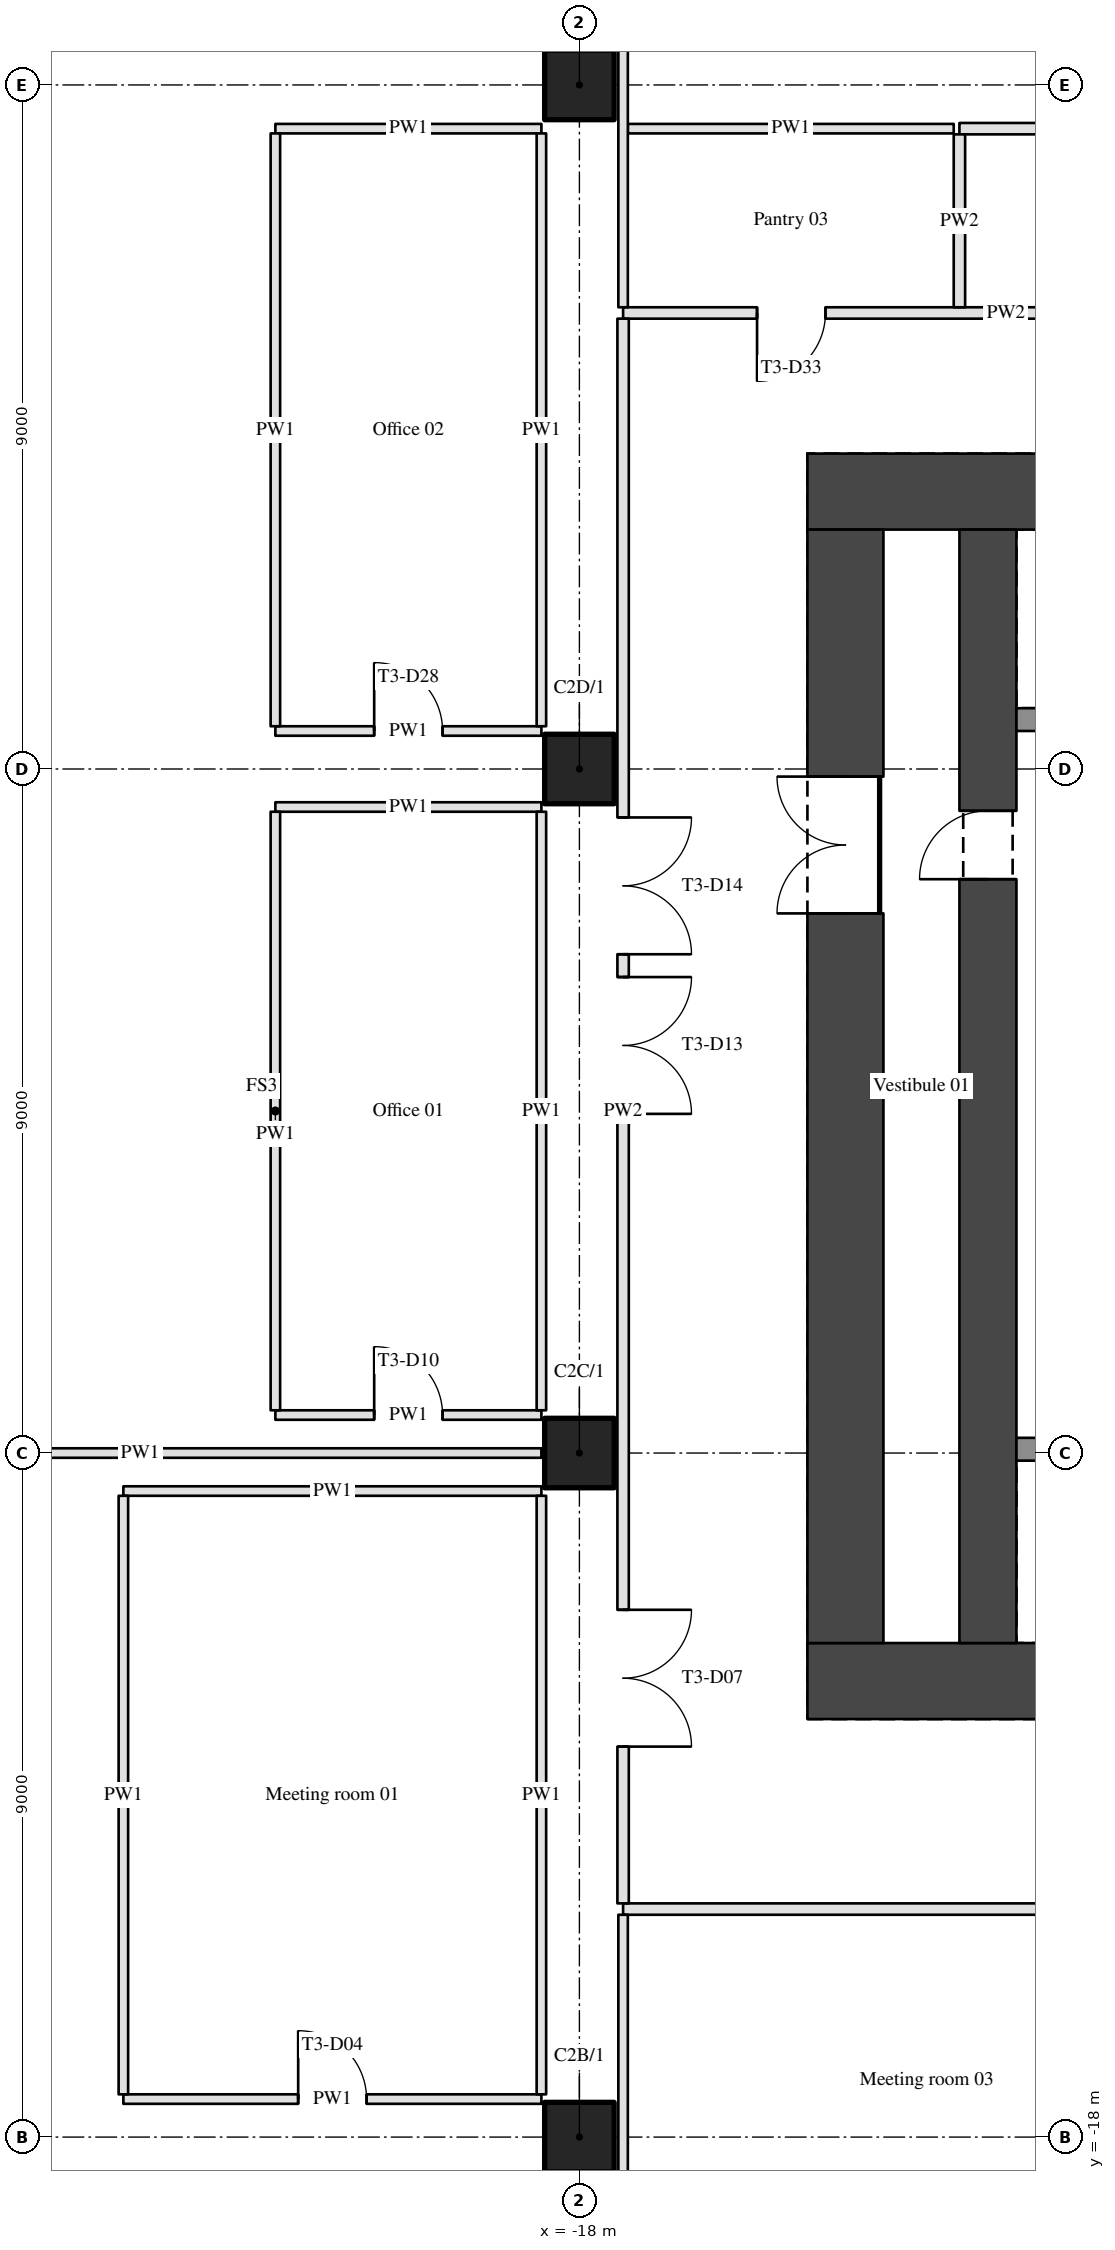
"""IFC4 building model, lengths in metres.
Left out: names, types, materials, properties, quantities, classifications, styles, units other than length and angle.
Written with IfcOpenShell. Run it as: python <this file> out.ifc"""

import sys

from ifc_helpers import new_model, si_unit, direction, frame, frame_2d, origin, origin_2d, place, context, subcontext, project, spatial, rectangle, hollow_circle, extrude, element, fill, save


model = new_model("IFC4")
c1 = context("Model", 3, precision=1e-05, world=origin(), true_north=direction((0.0, 1.0)))
c2 = subcontext(c1, "Body", "Model", "MODEL_VIEW")
j1 = project(units=[si_unit("LENGTHUNIT", "METRE"), si_unit("PLANEANGLEUNIT", "RADIAN")], contexts=[c1])
p1 = place(None, origin())
s1 = spatial("IfcSite", under=j1, at=p1, CompositionType="ELEMENT")
p2 = place(p1, origin())
s2 = spatial("IfcBuilding", under=s1, at=p2, CompositionType="ELEMENT")
p3 = place(p2, frame((0.0, 0.0, 53.7)))
s3 = spatial("IfcBuildingStorey", under=s2, at=p3, CompositionType="ELEMENT", Elevation=53.7)
for number, where, z_axis, x_axis in (
    (1, (-18.0, -18.0, 0.0), (0.0, 0.0, 1.0), (1.0, 0.0, 0.0)),
    (2, (-18.0, -9.0, 0.0), (0.0, 0.0, 1.0), (1.0, 0.0, 0.0)),
    (3, (-18.0, 0.0, 0.0), (0.0, 0.0, 1.0), (1.0, 0.0, 0.0)),
    (4, (-18.0, 9.0, 0.0), (0.0, 0.0, 1.0), (1.0, 0.0, 0.0)),
):
    element("IfcColumn", number, at=place(p3, frame(where, z_axis=z_axis, x_axis=x_axis)), inside=s3, PredefinedType="COLUMN", context=c2, shape_type="SweptSolid", body=[
        extrude(hollow_circle(Radius=0.457, WallThickness=0.05, at=origin_2d()), origin(), (0.0, 0.0, 1.0), 3.9),
    ])
for number, where, z_axis, x_axis in (
    (5, (-15.0, -12.0, 0.0), (0.0, 0.0, 1.0), (1.0, 0.0, 0.0)),
    (6, (-15.0, 3.65, 0.0), (0.0, 0.0, 1.0), (1.0, 0.0, 0.0)),
):
    element("IfcWall", number, at=place(p3, frame(where, z_axis=z_axis, x_axis=x_axis)), inside=s3, PredefinedType="SHEAR", context=c2, shape_type="SweptSolid", body=[
        extrude(rectangle(XDim=30.0, YDim=1.0, at=frame_2d((15.0, 0.0))), origin(), (0.0, 0.0, 1.0), 3.9),
    ])
p4 = place(p3, frame((-14.5, -11.5, 0.0), z_axis=(0.0, 0.0, 1.0), x_axis=(0.0, 1.0, 0.0)))
e7 = element("IfcWall", 7, at=p4, inside=s3, PredefinedType="SHEAR", context=c2, shape_type="SweptSolid", body=[
    extrude(rectangle(XDim=14.65, YDim=1.0, at=frame_2d((7.325, 0.0))), origin(), (0.0, 0.0, 1.0), 3.9),
])
p5 = place(p4, frame((9.6, 0.0, 0.0)))
e8 = element("IfcOpeningElement", 8, at=p5, cuts=e7, PredefinedType="OPENING", context=c2, shape_type="SweptSolid", body=[
    extrude(rectangle(XDim=1.8, YDim=2.1, at=frame_2d((0.9, 1.05))), frame((0.0, 0.51, 0.0), z_axis=(0.0, -1.0, 0.0), x_axis=(1.0, 0.0, 0.0)), (0.0, 0.0, 1.0), 1.02),
])
p6 = place(p3, frame((-12.625, -11.5, 0.0), z_axis=(0.0, 0.0, 1.0), x_axis=(0.0, 1.0, 0.0)))
e9 = element("IfcWall", 9, at=p6, inside=s3, PredefinedType="SHEAR", context=c2, shape_type="SweptSolid", body=[
    extrude(rectangle(XDim=14.65, YDim=0.75, at=frame_2d((7.325, 0.0))), origin(), (0.0, 0.0, 1.0), 3.9),
])
p7 = place(p6, frame((10.05, 0.0, 0.0)))
e10 = element("IfcOpeningElement", 10, at=p7, cuts=e9, PredefinedType="OPENING", context=c2, shape_type="SweptSolid", body=[
    extrude(rectangle(XDim=0.9, YDim=2.1, at=frame_2d((0.45, 1.05))), frame((0.0, 0.385, 0.0), z_axis=(0.0, -1.0, 0.0), x_axis=(1.0, 0.0, 0.0)), (0.0, 0.0, 1.0), 0.77),
])
p8 = place(p3, frame((-24.0, -17.5, 0.0), z_axis=(0.0, 0.0, 1.0), x_axis=(1.0, 0.0, 0.0)))
e11 = element("IfcWall", 11, at=p8, inside=s3, PredefinedType="PARTITIONING", context=c2, shape_type="SweptSolid", body=[
    extrude(rectangle(XDim=5.5, YDim=0.125, at=frame_2d((2.75, 0.0))), origin(), (0.0, 0.0, 1.0), 2.96),
])
p9 = place(p8, frame((2.3, 0.0, 0.0)))
e12 = element("IfcOpeningElement", 12, at=p9, cuts=e11, PredefinedType="OPENING", context=c2, shape_type="SweptSolid", body=[
    extrude(rectangle(XDim=0.9, YDim=2.1, at=frame_2d((0.45, 1.05))), frame((0.0, 0.073, 0.0), z_axis=(0.0, -1.0, 0.0), x_axis=(1.0, 0.0, 0.0)), (0.0, 0.0, 1.0), 0.145),
])
p10 = place(p3, frame((-17.425, -15.0, 0.0), z_axis=(0.0, 0.0, 1.0), x_axis=(1.0, 0.0, 0.0)))
e13 = element("IfcWall", 13, at=p10, inside=s3, PredefinedType="PARTITIONING", context=c2, shape_type="SweptSolid", body=[
    extrude(rectangle(XDim=34.85, YDim=0.15, at=frame_2d((17.425, 0.0))), origin(), (0.0, 0.0, 1.0), 2.96),
])
p11 = place(p10, frame((25.238, 0.0, 0.0)))
e14 = element("IfcOpeningElement", 14, at=p11, cuts=e13, PredefinedType="OPENING", context=c2, shape_type="SweptSolid", body=[
    extrude(rectangle(XDim=1.8, YDim=2.1, at=frame_2d((0.9, 1.05))), frame((0.0, 0.085, 0.0), z_axis=(0.0, -1.0, 0.0), x_axis=(1.0, 0.0, 0.0)), (0.0, 0.0, 1.0), 0.17),
])
p12 = place(p10, frame((23.137, 0.0, 0.0)))
e15 = element("IfcOpeningElement", 15, at=p12, cuts=e13, PredefinedType="OPENING", context=c2, shape_type="SweptSolid", body=[
    extrude(rectangle(XDim=1.8, YDim=2.1, at=frame_2d((0.9, 1.05))), frame((0.0, 0.085, 0.0), z_axis=(0.0, -1.0, 0.0), x_axis=(1.0, 0.0, 0.0)), (0.0, 0.0, 1.0), 0.17),
])
p13 = place(p3, frame((-24.0, -9.5, 0.0), z_axis=(0.0, 0.0, 1.0), x_axis=(1.0, 0.0, 0.0)))
e16 = element("IfcWall", 16, at=p13, inside=s3, PredefinedType="PARTITIONING", context=c2, shape_type="SweptSolid", body=[
    extrude(rectangle(XDim=5.5, YDim=0.125, at=frame_2d((2.75, 0.0))), origin(), (0.0, 0.0, 1.0), 2.96),
])
p14 = place(p3, frame((-29.057, -9.0, 0.0), z_axis=(0.0, 0.0, 1.0), x_axis=(1.0, 0.0, 0.0)))
e17 = element("IfcWall", 17, at=p14, inside=s3, PredefinedType="PARTITIONING", context=c2, shape_type="SweptSolid", body=[
    extrude(rectangle(XDim=10.557, YDim=0.125, at=frame_2d((5.278, 0.0))), origin(), (0.0, 0.0, 1.0), 2.96),
])
p15 = place(p3, frame((-12.25, -8.95, 0.0), z_axis=(0.0, 0.0, 1.0), x_axis=(1.0, 0.0, 0.0)))
e18 = element("IfcWall", 18, at=p15, inside=s3, PredefinedType="SHEAR", context=c2, shape_type="SweptSolid", body=[
    extrude(rectangle(XDim=2.75, YDim=0.3, at=frame_2d((1.375, 0.0))), origin(), (0.0, 0.0, 1.0), 3.9),
])
p16 = place(p3, frame((-22.0, -8.5, 0.0), z_axis=(0.0, 0.0, 1.0), x_axis=(1.0, 0.0, 0.0)))
e19 = element("IfcWall", 19, at=p16, inside=s3, PredefinedType="PARTITIONING", context=c2, shape_type="SweptSolid", body=[
    extrude(rectangle(XDim=3.5, YDim=0.125, at=frame_2d((1.75, 0.0))), origin(), (0.0, 0.0, 1.0), 2.96),
])
p17 = place(p16, frame((1.3, 0.0, 0.0)))
e20 = element("IfcOpeningElement", 20, at=p17, cuts=e19, PredefinedType="OPENING", context=c2, shape_type="SweptSolid", body=[
    extrude(rectangle(XDim=0.9, YDim=2.1, at=frame_2d((0.45, 1.05))), frame((0.0, 0.073, 0.0), z_axis=(0.0, -1.0, 0.0), x_axis=(1.0, 0.0, 0.0)), (0.0, 0.0, 1.0), 0.145),
])
p18 = place(p3, frame((-22.0, -0.5, 0.0), z_axis=(0.0, 0.0, 1.0), x_axis=(1.0, 0.0, 0.0)))
e21 = element("IfcWall", 21, at=p18, inside=s3, PredefinedType="PARTITIONING", context=c2, shape_type="SweptSolid", body=[
    extrude(rectangle(XDim=3.5, YDim=0.125, at=frame_2d((1.75, 0.0))), origin(), (0.0, 0.0, 1.0), 2.96),
])
p19 = place(p3, frame((-22.0, 0.5, 0.0), z_axis=(0.0, 0.0, 1.0), x_axis=(1.0, 0.0, 0.0)))
e22 = element("IfcWall", 22, at=p19, inside=s3, PredefinedType="PARTITIONING", context=c2, shape_type="SweptSolid", body=[
    extrude(rectangle(XDim=3.5, YDim=0.125, at=frame_2d((1.75, 0.0))), origin(), (0.0, 0.0, 1.0), 2.96),
])
p20 = place(p19, frame((1.3, 0.0, 0.0)))
e23 = element("IfcOpeningElement", 23, at=p20, cuts=e22, PredefinedType="OPENING", context=c2, shape_type="SweptSolid", body=[
    extrude(rectangle(XDim=0.9, YDim=2.1, at=frame_2d((0.45, 1.05))), frame((0.0, 0.073, 0.0), z_axis=(0.0, -1.0, 0.0), x_axis=(1.0, 0.0, 0.0)), (0.0, 0.0, 1.0), 0.145),
])
p21 = place(p3, frame((-9.0, 0.65, 0.0), z_axis=(0.0, 0.0, 1.0), x_axis=(-1.0, 0.0, 0.0)))
e24 = element("IfcWall", 24, at=p21, inside=s3, PredefinedType="SHEAR", context=c2, shape_type="SweptSolid", body=[
    extrude(rectangle(XDim=3.25, YDim=0.3, at=frame_2d((1.625, 0.0))), origin(), (0.0, 0.0, 1.0), 3.9),
])
p22 = place(p3, frame((-7.35, 6.0, 0.0), z_axis=(0.0, 0.0, 1.0), x_axis=(-1.0, 0.0, 0.0)))
e25 = element("IfcWall", 25, at=p22, inside=s3, PredefinedType="PARTITIONING", context=c2, shape_type="SweptSolid", body=[
    extrude(rectangle(XDim=10.075, YDim=0.15, at=frame_2d((5.038, 0.0))), origin(), (0.0, 0.0, 1.0), 2.96),
])
p23 = place(p22, frame((2.325, 0.0, 0.0)))
e26 = element("IfcOpeningElement", 26, at=p23, cuts=e25, PredefinedType="OPENING", context=c2, shape_type="SweptSolid", body=[
    extrude(rectangle(XDim=1.0, YDim=2.1, at=frame_2d((0.5, 1.05))), frame((0.0, 0.085, 0.0), z_axis=(0.0, -1.0, 0.0), x_axis=(1.0, 0.0, 0.0)), (0.0, 0.0, 1.0), 0.17),
])
p24 = place(p22, frame((7.413, 0.0, 0.0)))
e27 = element("IfcOpeningElement", 27, at=p24, cuts=e25, PredefinedType="OPENING", context=c2, shape_type="SweptSolid", body=[
    extrude(rectangle(XDim=0.9, YDim=2.1, at=frame_2d((0.45, 1.05))), frame((0.0, 0.085, 0.0), z_axis=(0.0, -1.0, 0.0), x_axis=(1.0, 0.0, 0.0)), (0.0, 0.0, 1.0), 0.17),
])
p25 = place(p3, frame((-22.0, 8.425, 0.0), z_axis=(0.0, 0.0, 1.0), x_axis=(1.0, 0.0, 0.0)))
e28 = element("IfcWall", 28, at=p25, inside=s3, PredefinedType="PARTITIONING", context=c2, shape_type="SweptSolid", body=[
    extrude(rectangle(XDim=3.5, YDim=0.125, at=frame_2d((1.75, 0.0))), origin(), (0.0, 0.0, 1.0), 2.96),
])
p26 = place(p3, frame((-17.363, 8.425, 0.0), z_axis=(0.0, 0.0, 1.0), x_axis=(1.0, 0.0, 0.0)))
e29 = element("IfcWall", 29, at=p26, inside=s3, PredefinedType="PARTITIONING", context=c2, shape_type="SweptSolid", body=[
    extrude(rectangle(XDim=4.288, YDim=0.125, at=frame_2d((2.144, 0.0))), origin(), (0.0, 0.0, 1.0), 2.96),
])
p27 = place(p3, frame((-13.0, 8.425, 0.0), z_axis=(0.0, 0.0, 1.0), x_axis=(1.0, 0.0, 0.0)))
e30 = element("IfcWall", 30, at=p27, inside=s3, PredefinedType="PARTITIONING", context=c2, shape_type="SweptSolid", body=[
    extrude(rectangle(XDim=5.75, YDim=0.15, at=frame_2d((2.875, 0.0))), origin(), (0.0, 0.0, 1.0), 2.96),
])
p28 = place(p27, frame((1.675, 0.0, 0.0)))
e31 = element("IfcOpeningElement", 31, at=p28, cuts=e30, PredefinedType="OPENING", context=c2, shape_type="SweptSolid", body=[
    extrude(rectangle(XDim=1.8, YDim=2.1, at=frame_2d((0.9, 1.05))), frame((0.0, 0.085, 0.0), z_axis=(0.0, -1.0, 0.0), x_axis=(1.0, 0.0, 0.0)), (0.0, 0.0, 1.0), 0.17),
])
for number, where, z_axis, x_axis in (
    (32, (-24.0, -17.438, 0.0), (0.0, 0.0, 1.0), (0.0, 1.0, 0.0)),
    (33, (-22.0, -8.438, 0.0), (0.0, 0.0, 1.0), (0.0, 1.0, 0.0)),
):
    element("IfcWall", number, at=place(p3, frame(where, z_axis=z_axis, x_axis=x_axis)), inside=s3, PredefinedType="PARTITIONING", context=c2, shape_type="SweptSolid", body=[
        extrude(rectangle(XDim=7.875, YDim=0.125, at=frame_2d((3.938, 0.0))), origin(), (0.0, 0.0, 1.0), 2.96),
    ])
p29 = place(p3, frame((-22.0, 0.562, 0.0), z_axis=(0.0, 0.0, 1.0), x_axis=(0.0, 1.0, 0.0)))
e34 = element("IfcWall", 34, at=p29, inside=s3, PredefinedType="PARTITIONING", context=c2, shape_type="SweptSolid", body=[
    extrude(rectangle(XDim=7.8, YDim=0.125, at=frame_2d((3.9, 0.0))), origin(), (0.0, 0.0, 1.0), 2.96),
])
for number, where, z_axis, x_axis in (
    (35, (-18.5, -17.438, 0.0), (0.0, 0.0, 1.0), (0.0, 1.0, 0.0)),
    (36, (-18.5, -8.438, 0.0), (0.0, 0.0, 1.0), (0.0, 1.0, 0.0)),
):
    element("IfcWall", number, at=place(p3, frame(where, z_axis=z_axis, x_axis=x_axis)), inside=s3, PredefinedType="PARTITIONING", context=c2, shape_type="SweptSolid", body=[
        extrude(rectangle(XDim=7.875, YDim=0.125, at=frame_2d((3.938, 0.0))), origin(), (0.0, 0.0, 1.0), 2.96),
    ])
p30 = place(p3, frame((-18.5, 0.562, 0.0), z_axis=(0.0, 0.0, 1.0), x_axis=(0.0, 1.0, 0.0)))
e37 = element("IfcWall", 37, at=p30, inside=s3, PredefinedType="PARTITIONING", context=c2, shape_type="SweptSolid", body=[
    extrude(rectangle(XDim=7.8, YDim=0.125, at=frame_2d((3.9, 0.0))), origin(), (0.0, 0.0, 1.0), 2.96),
])
p31 = place(p3, frame((-17.425, -26.057, 0.0), z_axis=(0.0, 0.0, 1.0), x_axis=(0.0, 1.0, 0.0)))
e38 = element("IfcWall", 38, at=p31, inside=s3, PredefinedType="PARTITIONING", context=c2, shape_type="SweptSolid", body=[
    extrude(rectangle(XDim=10.982, YDim=0.125, at=frame_2d((5.491, 0.0))), origin(), (0.0, 0.0, 1.0), 2.96),
])
p32 = place(p3, frame((-17.425, 5.925, 0.0), z_axis=(0.0, 0.0, 1.0), x_axis=(0.0, -1.0, 0.0)))
e39 = element("IfcWall", 39, at=p32, inside=s3, PredefinedType="PARTITIONING", context=c2, shape_type="SweptSolid", body=[
    extrude(rectangle(XDim=20.85, YDim=0.15, at=frame_2d((10.425, 0.0))), origin(), (0.0, 0.0, 1.0), 2.96),
])
p33 = place(p32, frame((16.988, 0.0, 0.0)))
e40 = element("IfcOpeningElement", 40, at=p33, cuts=e39, PredefinedType="OPENING", context=c2, shape_type="SweptSolid", body=[
    extrude(rectangle(XDim=1.8, YDim=2.1, at=frame_2d((0.9, 1.05))), frame((0.0, 0.085, 0.0), z_axis=(0.0, -1.0, 0.0), x_axis=(1.0, 0.0, 0.0)), (0.0, 0.0, 1.0), 0.17),
])
p34 = place(p32, frame((6.562, 0.0, 0.0)))
e41 = element("IfcOpeningElement", 41, at=p34, cuts=e39, PredefinedType="OPENING", context=c2, shape_type="SweptSolid", body=[
    extrude(rectangle(XDim=1.8, YDim=2.1, at=frame_2d((0.9, 1.05))), frame((0.0, 0.085, 0.0), z_axis=(0.0, -1.0, 0.0), x_axis=(1.0, 0.0, 0.0)), (0.0, 0.0, 1.0), 0.17),
])
p35 = place(p32, frame((8.663, 0.0, 0.0)))
e42 = element("IfcOpeningElement", 42, at=p35, cuts=e39, PredefinedType="OPENING", context=c2, shape_type="SweptSolid", body=[
    extrude(rectangle(XDim=1.8, YDim=2.1, at=frame_2d((0.9, 1.05))), frame((0.0, 0.085, 0.0), z_axis=(0.0, -1.0, 0.0), x_axis=(1.0, 0.0, 0.0)), (0.0, 0.0, 1.0), 0.17),
])
p36 = place(p3, frame((-17.425, 6.075, 0.0), z_axis=(0.0, 0.0, 1.0), x_axis=(0.0, 1.0, 0.0)))
e43 = element("IfcWall", 43, at=p36, inside=s3, PredefinedType="PARTITIONING", context=c2, shape_type="SweptSolid", body=[
    extrude(rectangle(XDim=19.982, YDim=0.125, at=frame_2d((9.991, 0.0))), origin(), (0.0, 0.0, 1.0), 2.96),
])
p37 = place(p3, frame((-13.0, 6.075, 0.0), z_axis=(0.0, 0.0, 1.0), x_axis=(0.0, 1.0, 0.0)))
e44 = element("IfcWall", 44, at=p37, inside=s3, PredefinedType="PARTITIONING", context=c2, shape_type="SweptSolid", body=[
    extrude(rectangle(XDim=2.275, YDim=0.15, at=frame_2d((1.138, 0.0))), origin(), (0.0, 0.0, 1.0), 2.96),
])
p38 = place(p5, origin())
e45 = element("IfcDoor", 45, at=p38, inside=s3, OperationType="DOUBLE_DOOR_SINGLE_SWING", PredefinedType="DOOR", context=c2, shape_type="SweptSolid", body=[
    extrude(rectangle(XDim=1.8, YDim=2.1, at=frame_2d((0.9, 1.05))), frame((0.0, 0.025, 0.0), z_axis=(0.0, -1.0, 0.0), x_axis=(1.0, 0.0, 0.0)), (0.0, 0.0, 1.0), 0.05),
])
fill(e8, e45)
p39 = place(p33, origin())
e46 = element("IfcDoor", 46, at=p39, inside=s3, OperationType="DOUBLE_DOOR_SINGLE_SWING", PredefinedType="DOOR", context=c2, shape_type="SweptSolid", body=[
    extrude(rectangle(XDim=1.8, YDim=2.1, at=frame_2d((0.9, 1.05))), frame((0.0, 0.025, 0.0), z_axis=(0.0, -1.0, 0.0), x_axis=(1.0, 0.0, 0.0)), (0.0, 0.0, 1.0), 0.05),
])
fill(e40, e46)
p40 = place(p34, origin())
e47 = element("IfcDoor", 47, at=p40, inside=s3, OperationType="DOUBLE_DOOR_SINGLE_SWING", PredefinedType="DOOR", context=c2, shape_type="SweptSolid", body=[
    extrude(rectangle(XDim=1.8, YDim=2.1, at=frame_2d((0.9, 1.05))), frame((0.0, 0.025, 0.0), z_axis=(0.0, -1.0, 0.0), x_axis=(1.0, 0.0, 0.0)), (0.0, 0.0, 1.0), 0.05),
])
fill(e41, e47)
p41 = place(p35, origin())
e48 = element("IfcDoor", 48, at=p41, inside=s3, OperationType="DOUBLE_DOOR_SINGLE_SWING", PredefinedType="DOOR", context=c2, shape_type="SweptSolid", body=[
    extrude(rectangle(XDim=1.8, YDim=2.1, at=frame_2d((0.9, 1.05))), frame((0.0, 0.025, 0.0), z_axis=(0.0, -1.0, 0.0), x_axis=(1.0, 0.0, 0.0)), (0.0, 0.0, 1.0), 0.05),
])
fill(e42, e48)
p42 = place(p24, origin())
e49 = element("IfcDoor", 49, at=p42, inside=s3, OperationType="SINGLE_SWING_RIGHT", PredefinedType="DOOR", context=c2, shape_type="SweptSolid", body=[
    extrude(rectangle(XDim=0.9, YDim=2.1, at=frame_2d((0.45, 1.05))), frame((0.0, 0.025, 0.0), z_axis=(0.0, -1.0, 0.0), x_axis=(1.0, 0.0, 0.0)), (0.0, 0.0, 1.0), 0.05),
])
fill(e27, e49)
p43 = place(p7, origin())
e50 = element("IfcDoor", 50, at=p43, inside=s3, OperationType="SINGLE_SWING_LEFT", PredefinedType="DOOR", context=c2, shape_type="SweptSolid", body=[
    extrude(rectangle(XDim=0.9, YDim=2.1, at=frame_2d((0.45, 1.05))), frame((0.0, 0.025, 0.0), z_axis=(0.0, -1.0, 0.0), x_axis=(1.0, 0.0, 0.0)), (0.0, 0.0, 1.0), 0.05),
])
fill(e10, e50)
p44 = place(p9, origin())
e51 = element("IfcDoor", 51, at=p44, inside=s3, OperationType="SINGLE_SWING_LEFT", PredefinedType="DOOR", context=c2, shape_type="SweptSolid", body=[
    extrude(rectangle(XDim=0.9, YDim=2.1, at=frame_2d((0.45, 1.05))), frame((0.0, 0.025, 0.0), z_axis=(0.0, -1.0, 0.0), x_axis=(1.0, 0.0, 0.0)), (0.0, 0.0, 1.0), 0.05),
])
fill(e12, e51)
p45 = place(p17, origin())
e52 = element("IfcDoor", 52, at=p45, inside=s3, OperationType="SINGLE_SWING_LEFT", PredefinedType="DOOR", context=c2, shape_type="SweptSolid", body=[
    extrude(rectangle(XDim=0.9, YDim=2.1, at=frame_2d((0.45, 1.05))), frame((0.0, 0.025, 0.0), z_axis=(0.0, -1.0, 0.0), x_axis=(1.0, 0.0, 0.0)), (0.0, 0.0, 1.0), 0.05),
])
fill(e20, e52)
p46 = place(p20, origin())
e53 = element("IfcDoor", 53, at=p46, inside=s3, OperationType="SINGLE_SWING_LEFT", PredefinedType="DOOR", context=c2, shape_type="SweptSolid", body=[
    extrude(rectangle(XDim=0.9, YDim=2.1, at=frame_2d((0.45, 1.05))), frame((0.0, 0.025, 0.0), z_axis=(0.0, -1.0, 0.0), x_axis=(1.0, 0.0, 0.0)), (0.0, 0.0, 1.0), 0.05),
])
fill(e23, e53)
save(model, sys.argv[1])
